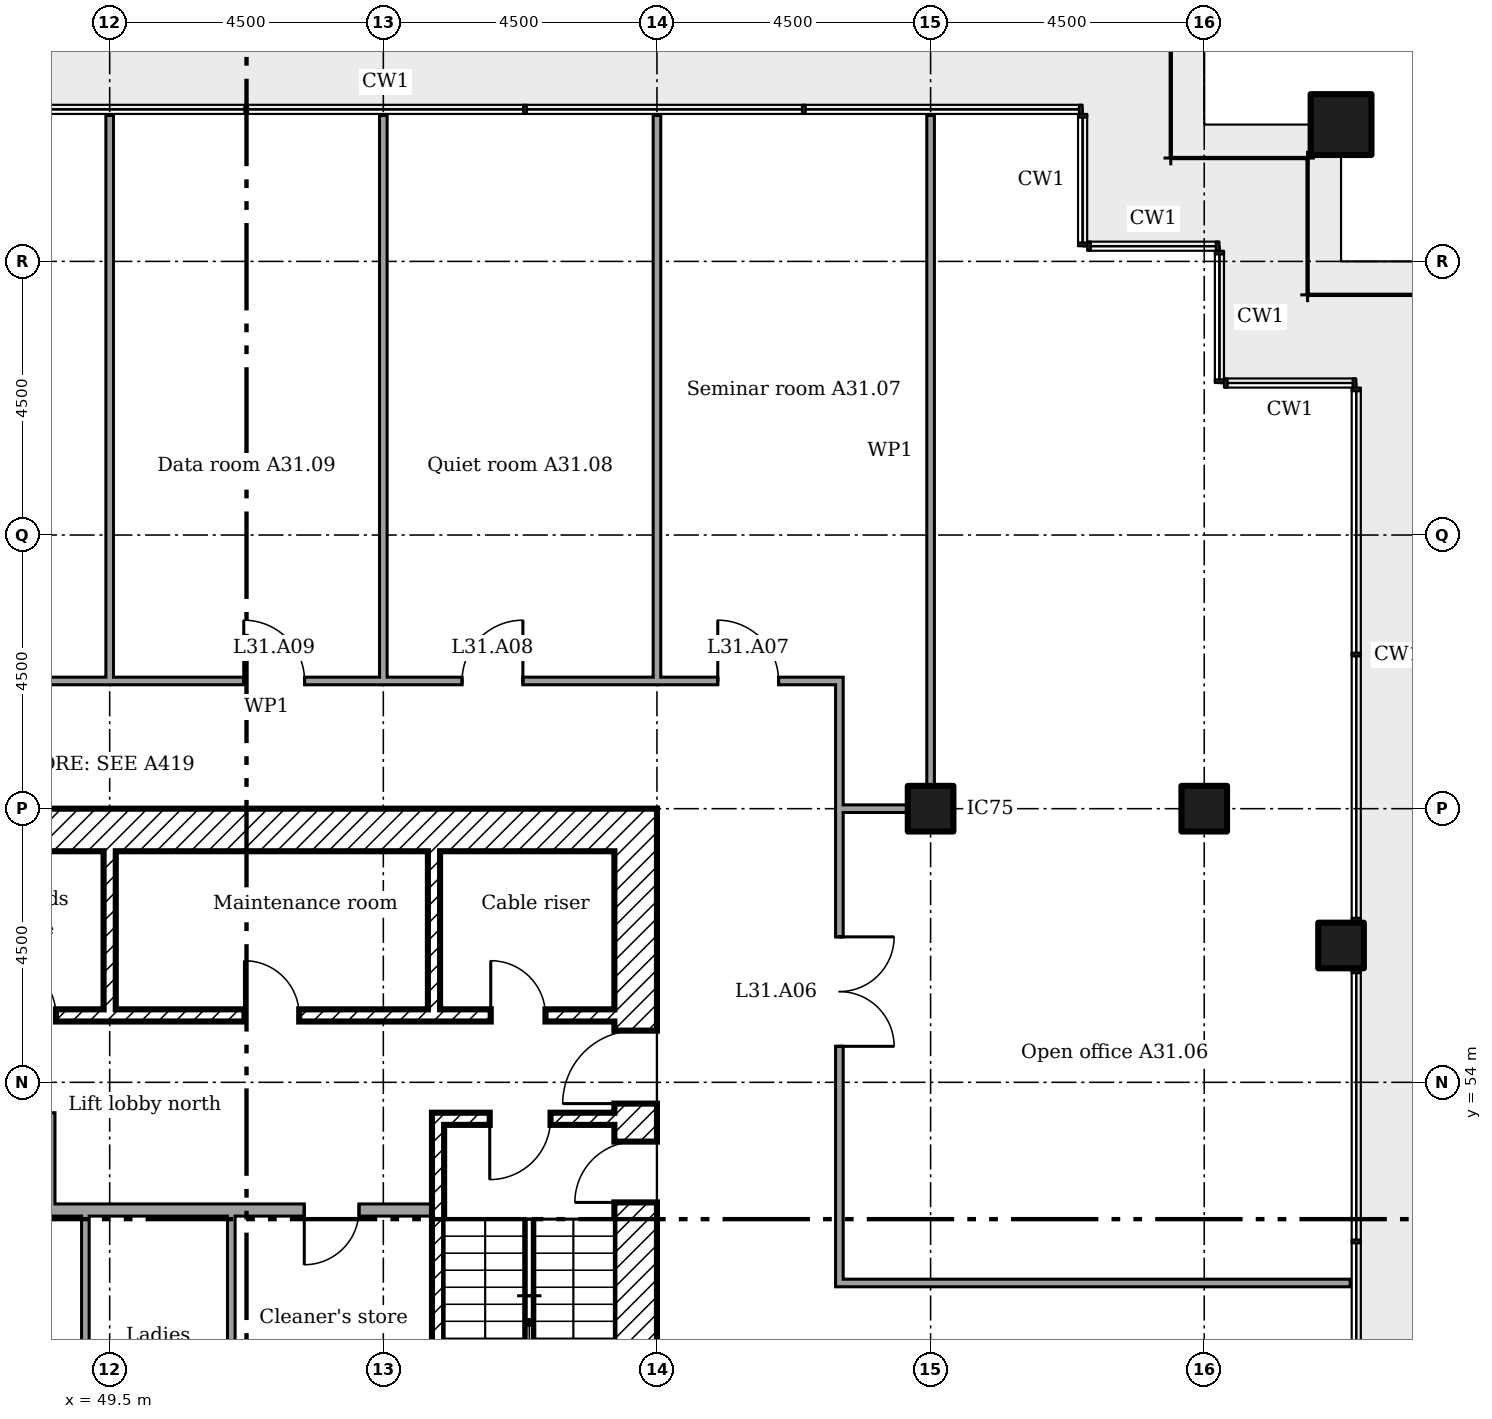
"""IFC4 building model, lengths in metres.
Left out: names, types, materials, properties, quantities, classifications, styles, units other than length and angle.
Written with IfcOpenShell. Run it as: python <this file> out.ifc"""

import sys

from ifc_helpers import new_model, si_unit, direction, frame, frame_2d, origin, origin_2d, place, context, subcontext, project, spatial, rectangle, extrude, element, fill, save


model = new_model("IFC4")
c1 = context("Model", 3, precision=1e-05, world=origin(), true_north=direction((0.0, 1.0)))
c2 = subcontext(c1, "Body", "Model", "MODEL_VIEW")
j1 = project(units=[si_unit("LENGTHUNIT", "METRE"), si_unit("PLANEANGLEUNIT", "RADIAN")], contexts=[c1])
p1 = place(None, origin())
s1 = spatial("IfcSite", under=j1, at=p1, CompositionType="ELEMENT")
p2 = place(p1, origin())
s2 = spatial("IfcBuilding", under=s1, at=p2, CompositionType="ELEMENT")
p3 = place(p2, frame((0.0, 0.0, 128.0)))
s3 = spatial("IfcBuildingStorey", under=s2, at=p3, CompositionType="ELEMENT", Elevation=128.0)
p4 = place(p3, frame((69.75, 69.75, 0.0)))
e1 = element("IfcColumn", 1, at=p4, inside=s3, PredefinedType="COLUMN", context=c2, shape_type="SweptSolid", body=[
    extrude(rectangle(XDim=1.0, YDim=1.0, at=origin_2d()), origin(), (0.0, 0.0, 1.0), 3.6),
])
for number, where in (
    (2, (63.0, 58.5, 0.0)),
    (3, (67.5, 58.5, 0.0)),
    (4, (69.75, 56.25, 0.0)),
):
    element("IfcColumn", number, at=place(p3, frame(where)), inside=s3, PredefinedType="COLUMN", context=c2, shape_type="SweptSolid", body=[
        extrude(rectangle(XDim=0.75, YDim=0.75, at=origin_2d()), origin(), (0.0, 0.0, 1.0), 3.6),
    ])
p5 = place(p3, frame((58.15, 40.5, 0.0), z_axis=(0.0, 0.0, 1.0), x_axis=(0.0, 1.0, 0.0)))
e5 = element("IfcWall", 5, at=p5, inside=s3, PredefinedType="SHEAR", context=c2, shape_type="SweptSolid", body=[
    extrude(rectangle(XDim=18.0, YDim=0.7, at=frame_2d((9.0, 0.0))), origin(), (0.0, 0.0, 1.0), 3.35),
])
p6 = place(p5, frame((13.15, 0.0, 0.0)))
e6 = element("IfcOpeningElement", 6, at=p6, cuts=e5, PredefinedType="OPENING", context=c2, shape_type="SweptSolid", body=[
    extrude(rectangle(XDim=1.2, YDim=2.1, at=frame_2d((0.6, 1.05))), frame((0.0, 0.36, 0.0), z_axis=(0.0, -1.0, 0.0), x_axis=(1.0, 0.0, 0.0)), (0.0, 0.0, 1.0), 0.72),
])
p7 = place(p5, frame((3.9, 0.0, 0.0)))
e7 = element("IfcOpeningElement", 7, at=p7, cuts=e5, PredefinedType="OPENING", context=c2, shape_type="SweptSolid", body=[
    extrude(rectangle(XDim=1.8, YDim=2.1, at=frame_2d((0.9, 1.05))), frame((0.0, 0.36, 0.0), z_axis=(0.0, -1.0, 0.0), x_axis=(1.0, 0.0, 0.0)), (0.0, 0.0, 1.0), 0.72),
])
p8 = place(p5, frame((11.525, 0.0, 0.0)))
e8 = element("IfcOpeningElement", 8, at=p8, cuts=e5, PredefinedType="OPENING", context=c2, shape_type="SweptSolid", body=[
    extrude(rectangle(XDim=1.0, YDim=2.1, at=frame_2d((0.5, 1.05))), frame((0.0, 0.36, 0.0), z_axis=(0.0, -1.0, 0.0), x_axis=(1.0, 0.0, 0.0)), (0.0, 0.0, 1.0), 0.72),
])
p9 = place(p3, frame((41.2, 58.15, 0.0)))
e9 = element("IfcWall", 9, at=p9, inside=s3, PredefinedType="SHEAR", context=c2, shape_type="SweptSolid", body=[
    extrude(rectangle(XDim=16.6, YDim=0.7, at=frame_2d((8.3, 0.0))), origin(), (0.0, 0.0, 1.0), 3.35),
])
for number, where, z_axis, x_axis in (
    (10, (49.5, 57.8, 0.0), (0.0, 0.0, 1.0), (0.0, -1.0, 0.0)),
    (11, (54.833, 57.8, 0.0), (0.0, 0.0, 1.0), (0.0, -1.0, 0.0)),
):
    element("IfcWall", number, at=place(p3, frame(where, z_axis=z_axis, x_axis=x_axis)), inside=s3, PredefinedType="SHEAR", context=c2, shape_type="SweptSolid", body=[
        extrude(rectangle(XDim=2.6, YDim=0.2, at=frame_2d((1.3, 0.0))), origin(), (0.0, 0.0, 1.0), 3.35),
    ])
p10 = place(p3, frame((48.5, 51.9, 0.0), z_axis=(0.0, 0.0, 1.0), x_axis=(0.0, 1.0, 0.0)))
e12 = element("IfcWall", 12, at=p10, inside=s3, PredefinedType="PARTITIONING", context=c2, shape_type="SweptSolid", body=[
    extrude(rectangle(XDim=1.6, YDim=0.2, at=frame_2d((0.8, 0.0))), origin(), (0.0, 0.0, 1.0), 3.35),
])
p11 = place(p3, frame((46.933, 55.1, 0.0)))
e13 = element("IfcWall", 13, at=p11, inside=s3, PredefinedType="SHEAR", context=c2, shape_type="SweptSolid", body=[
    extrude(rectangle(XDim=10.867, YDim=0.2, at=frame_2d((5.433, 0.0))), origin(), (0.0, 0.0, 1.0), 3.35),
])
p12 = place(p11, frame((8.833, 0.0, 0.0)))
e14 = element("IfcOpeningElement", 14, at=p12, cuts=e13, PredefinedType="OPENING", context=c2, shape_type="SweptSolid", body=[
    extrude(rectangle(XDim=0.9, YDim=2.1, at=frame_2d((0.45, 1.05))), frame((0.0, 0.11, 0.0), z_axis=(0.0, -1.0, 0.0), x_axis=(1.0, 0.0, 0.0)), (0.0, 0.0, 1.0), 0.22),
])
p13 = place(p11, frame((0.783, 0.0, 0.0)))
e15 = element("IfcOpeningElement", 15, at=p13, cuts=e13, PredefinedType="OPENING", context=c2, shape_type="SweptSolid", body=[
    extrude(rectangle(XDim=0.9, YDim=2.1, at=frame_2d((0.45, 1.05))), frame((0.0, 0.11, 0.0), z_axis=(0.0, -1.0, 0.0), x_axis=(1.0, 0.0, 0.0)), (0.0, 0.0, 1.0), 0.22),
])
p14 = place(p11, frame((4.783, 0.0, 0.0)))
e16 = element("IfcOpeningElement", 16, at=p14, cuts=e13, PredefinedType="OPENING", context=c2, shape_type="SweptSolid", body=[
    extrude(rectangle(XDim=0.9, YDim=2.1, at=frame_2d((0.45, 1.05))), frame((0.0, 0.11, 0.0), z_axis=(0.0, -1.0, 0.0), x_axis=(1.0, 0.0, 0.0)), (0.0, 0.0, 1.0), 0.22),
])
p15 = place(p3, frame((54.8, 53.4, 0.0)))
e17 = element("IfcWall", 17, at=p15, inside=s3, PredefinedType="SHEAR", context=c2, shape_type="SweptSolid", body=[
    extrude(rectangle(XDim=3.0, YDim=0.2, at=frame_2d((1.5, 0.0))), origin(), (0.0, 0.0, 1.0), 3.35),
])
p16 = place(p15, frame((0.95, 0.0, 0.0)))
e18 = element("IfcOpeningElement", 18, at=p16, cuts=e17, PredefinedType="OPENING", context=c2, shape_type="SweptSolid", body=[
    extrude(rectangle(XDim=1.0, YDim=2.1, at=frame_2d((0.5, 1.05))), frame((0.0, 0.11, 0.0), z_axis=(0.0, -1.0, 0.0), x_axis=(1.0, 0.0, 0.0)), (0.0, 0.0, 1.0), 0.22),
])
p17 = place(p3, frame((54.9, 46.8, 0.0), z_axis=(0.0, 0.0, 1.0), x_axis=(0.0, 1.0, 0.0)))
e19 = element("IfcWall", 19, at=p17, inside=s3, PredefinedType="SHEAR", context=c2, shape_type="SweptSolid", body=[
    extrude(rectangle(XDim=6.5, YDim=0.2, at=frame_2d((3.25, 0.0))), origin(), (0.0, 0.0, 1.0), 3.35),
])
p18 = place(p3, frame((44.2, 51.9, 0.0)))
e20 = element("IfcWall", 20, at=p18, inside=s3, PredefinedType="PARTITIONING", context=c2, shape_type="SweptSolid", body=[
    extrude(rectangle(XDim=10.6, YDim=0.2, at=frame_2d((5.3, 0.0))), origin(), (0.0, 0.0, 1.0), 3.35),
])
p19 = place(p18, frame((8.5, 0.0, 0.0)))
e21 = element("IfcOpeningElement", 21, at=p19, cuts=e20, PredefinedType="OPENING", context=c2, shape_type="SweptSolid", body=[
    extrude(rectangle(XDim=0.9, YDim=2.1, at=frame_2d((0.45, 1.05))), frame((0.0, 0.11, 0.0), z_axis=(0.0, -1.0, 0.0), x_axis=(1.0, 0.0, 0.0)), (0.0, 0.0, 1.0), 0.22),
])
p20 = place(p3, frame((49.1, 46.8, 0.0), z_axis=(0.0, 0.0, 1.0), x_axis=(0.0, 1.0, 0.0)))
e22 = element("IfcWall", 22, at=p20, inside=s3, PredefinedType="PARTITIONING", context=c2, shape_type="SweptSolid", body=[
    extrude(rectangle(XDim=5.0, YDim=0.125, at=frame_2d((2.5, 0.0))), origin(), (0.0, 0.0, 1.0), 3.35),
])
p21 = place(p3, frame((51.5, 49.5, 0.0), z_axis=(0.0, 0.0, 1.0), x_axis=(0.0, 1.0, 0.0)))
e23 = element("IfcWall", 23, at=p21, inside=s3, PredefinedType="PARTITIONING", context=c2, shape_type="SweptSolid", body=[
    extrude(rectangle(XDim=2.3, YDim=0.125, at=frame_2d((1.15, 0.0))), origin(), (0.0, 0.0, 1.0), 3.35),
])
p22 = place(p3, frame((61.438, 50.7, 0.0)))
e24 = element("IfcWall", 24, at=p22, inside=s3, PredefinedType="PARTITIONING", context=c2, shape_type="SweptSolid", body=[
    extrude(rectangle(XDim=8.462, YDim=0.125, at=frame_2d((4.231, 0.0))), origin(), (0.0, 0.0, 1.0), 3.45),
])
p23 = place(p3, frame((61.5, 58.5, 0.0)))
e25 = element("IfcWall", 25, at=p23, inside=s3, PredefinedType="PARTITIONING", context=c2, shape_type="SweptSolid", body=[
    extrude(rectangle(XDim=1.125, YDim=0.125, at=frame_2d((0.562, 0.0))), origin(), (0.0, 0.0, 1.0), 2.676),
])
p24 = place(p3, frame((42.6, 60.6, 0.0)))
e26 = element("IfcWall", 26, at=p24, inside=s3, PredefinedType="PARTITIONING", context=c2, shape_type="SweptSolid", body=[
    extrude(rectangle(XDim=18.962, YDim=0.125, at=frame_2d((9.481, 0.0))), origin(), (0.0, 0.0, 1.0), 3.45),
])
p25 = place(p24, frame((16.9, 0.0, 0.0)))
e27 = element("IfcOpeningElement", 27, at=p25, cuts=e26, PredefinedType="OPENING", context=c2, shape_type="SweptSolid", body=[
    extrude(rectangle(XDim=1.0, YDim=2.1, at=frame_2d((0.5, 1.05))), frame((0.0, 0.073, 0.0), z_axis=(0.0, -1.0, 0.0), x_axis=(1.0, 0.0, 0.0)), (0.0, 0.0, 1.0), 0.145),
])
p26 = place(p24, frame((12.695, 0.0, 0.0)))
e28 = element("IfcOpeningElement", 28, at=p26, cuts=e26, PredefinedType="OPENING", context=c2, shape_type="SweptSolid", body=[
    extrude(rectangle(XDim=1.0, YDim=2.1, at=frame_2d((0.5, 1.05))), frame((0.0, 0.073, 0.0), z_axis=(0.0, -1.0, 0.0), x_axis=(1.0, 0.0, 0.0)), (0.0, 0.0, 1.0), 0.145),
])
p27 = place(p24, frame((9.105, 0.0, 0.0)))
e29 = element("IfcOpeningElement", 29, at=p27, cuts=e26, PredefinedType="OPENING", context=c2, shape_type="SweptSolid", body=[
    extrude(rectangle(XDim=1.0, YDim=2.1, at=frame_2d((0.5, 1.05))), frame((0.0, 0.073, 0.0), z_axis=(0.0, -1.0, 0.0), x_axis=(1.0, 0.0, 0.0)), (0.0, 0.0, 1.0), 0.145),
])
p28 = place(p24, frame((2.95, 0.0, 0.0)))
e30 = element("IfcOpeningElement", 30, at=p28, cuts=e26, PredefinedType="OPENING", context=c2, shape_type="SweptSolid", body=[
    extrude(rectangle(XDim=1.0, YDim=2.1, at=frame_2d((0.5, 1.05))), frame((0.0, 0.073, 0.0), z_axis=(0.0, -1.0, 0.0), x_axis=(1.0, 0.0, 0.0)), (0.0, 0.0, 1.0), 0.145),
])
for number, where, z_axis, x_axis in (
    (31, (49.5, 60.6, 0.0), (0.0, 0.0, 1.0), (0.0, 1.0, 0.0)),
    (32, (54.0, 60.6, 0.0), (0.0, 0.0, 1.0), (0.0, 1.0, 0.0)),
    (33, (58.5, 60.6, 0.0), (0.0, 0.0, 1.0), (0.0, 1.0, 0.0)),
):
    element("IfcWall", number, at=place(p3, frame(where, z_axis=z_axis, x_axis=x_axis)), inside=s3, PredefinedType="PARTITIONING", context=c2, shape_type="SweptSolid", body=[
        extrude(rectangle(XDim=9.3, YDim=0.125, at=frame_2d((4.65, 0.0))), origin(), (0.0, 0.0, 1.0), 2.766),
    ])
p29 = place(p3, frame((61.5, 50.762, 0.0), z_axis=(0.0, 0.0, 1.0), x_axis=(0.0, 1.0, 0.0)))
e34 = element("IfcWall", 34, at=p29, inside=s3, PredefinedType="PARTITIONING", context=c2, shape_type="SweptSolid", body=[
    extrude(rectangle(XDim=9.775, YDim=0.125, at=frame_2d((4.888, 0.0))), origin(), (0.0, 0.0, 1.0), 3.45),
])
p30 = place(p29, frame((3.83, 0.0, 0.0)))
e35 = element("IfcOpeningElement", 35, at=p30, cuts=e34, PredefinedType="OPENING", context=c2, shape_type="SweptSolid", body=[
    extrude(rectangle(XDim=1.8, YDim=2.1, at=frame_2d((0.9, 1.05))), frame((0.0, 0.073, 0.0), z_axis=(0.0, -1.0, 0.0), x_axis=(1.0, 0.0, 0.0)), (0.0, 0.0, 1.0), 0.145),
])
p31 = place(p3, frame((63.0, 58.875, 0.0), z_axis=(0.0, 0.0, 1.0), x_axis=(0.0, 1.0, 0.0)))
e36 = element("IfcWall", 36, at=p31, inside=s3, PredefinedType="PARTITIONING", context=c2, shape_type="SweptSolid", body=[
    extrude(rectangle(XDim=11.025, YDim=0.125, at=frame_2d((5.512, 0.0))), origin(), (0.0, 0.0, 1.0), 2.766),
])
p32 = place(p6, origin())
e37 = element("IfcDoor", 37, at=p32, inside=s3, OperationType="SINGLE_SWING_RIGHT", PredefinedType="DOOR", context=c2, shape_type="SweptSolid", body=[
    extrude(rectangle(XDim=1.2, YDim=2.1, at=frame_2d((0.6, 1.05))), frame((0.0, 0.025, 0.0), z_axis=(0.0, -1.0, 0.0), x_axis=(1.0, 0.0, 0.0)), (0.0, 0.0, 1.0), 0.05),
])
fill(e6, e37)
p33 = place(p16, frame((1.0, 0.0, 0.0), x_axis=(-1.0, 0.0, 0.0)))
e38 = element("IfcDoor", 38, at=p33, inside=s3, OperationType="SINGLE_SWING_LEFT", PredefinedType="DOOR", context=c2, shape_type="SweptSolid", body=[
    extrude(rectangle(XDim=1.0, YDim=2.1, at=frame_2d((0.5, 1.05))), frame((0.0, 0.025, 0.0), z_axis=(0.0, -1.0, 0.0), x_axis=(1.0, 0.0, 0.0)), (0.0, 0.0, 1.0), 0.05),
])
fill(e18, e38)
p34 = place(p8, origin())
e39 = element("IfcDoor", 39, at=p34, inside=s3, OperationType="SINGLE_SWING_RIGHT", PredefinedType="DOOR", context=c2, shape_type="SweptSolid", body=[
    extrude(rectangle(XDim=1.0, YDim=2.1, at=frame_2d((0.5, 1.05))), frame((0.0, 0.025, 0.0), z_axis=(0.0, -1.0, 0.0), x_axis=(1.0, 0.0, 0.0)), (0.0, 0.0, 1.0), 0.05),
])
fill(e8, e39)
p35 = place(p12, origin())
e40 = element("IfcDoor", 40, at=p35, inside=s3, OperationType="SINGLE_SWING_RIGHT", PredefinedType="DOOR", context=c2, shape_type="SweptSolid", body=[
    extrude(rectangle(XDim=0.9, YDim=2.1, at=frame_2d((0.45, 1.05))), frame((0.0, 0.025, 0.0), z_axis=(0.0, -1.0, 0.0), x_axis=(1.0, 0.0, 0.0)), (0.0, 0.0, 1.0), 0.05),
])
fill(e14, e40)
p36 = place(p13, origin())
e41 = element("IfcDoor", 41, at=p36, inside=s3, OperationType="SINGLE_SWING_RIGHT", PredefinedType="DOOR", context=c2, shape_type="SweptSolid", body=[
    extrude(rectangle(XDim=0.9, YDim=2.1, at=frame_2d((0.45, 1.05))), frame((0.0, 0.025, 0.0), z_axis=(0.0, -1.0, 0.0), x_axis=(1.0, 0.0, 0.0)), (0.0, 0.0, 1.0), 0.05),
])
fill(e15, e41)
p37 = place(p14, origin())
e42 = element("IfcDoor", 42, at=p37, inside=s3, OperationType="SINGLE_SWING_RIGHT", PredefinedType="DOOR", context=c2, shape_type="SweptSolid", body=[
    extrude(rectangle(XDim=0.9, YDim=2.1, at=frame_2d((0.45, 1.05))), frame((0.0, 0.025, 0.0), z_axis=(0.0, -1.0, 0.0), x_axis=(1.0, 0.0, 0.0)), (0.0, 0.0, 1.0), 0.05),
])
fill(e16, e42)
p38 = place(p19, frame((0.9, 0.0, 0.0), x_axis=(-1.0, 0.0, 0.0)))
e43 = element("IfcDoor", 43, at=p38, inside=s3, OperationType="SINGLE_SWING_LEFT", PredefinedType="DOOR", context=c2, shape_type="SweptSolid", body=[
    extrude(rectangle(XDim=0.9, YDim=2.1, at=frame_2d((0.45, 1.05))), frame((0.0, 0.025, 0.0), z_axis=(0.0, -1.0, 0.0), x_axis=(1.0, 0.0, 0.0)), (0.0, 0.0, 1.0), 0.05),
])
fill(e21, e43)
p39 = place(p30, frame((1.8, 0.0, 0.0), x_axis=(-1.0, 0.0, 0.0)))
e44 = element("IfcDoor", 44, at=p39, inside=s3, OperationType="DOUBLE_DOOR_SINGLE_SWING", PredefinedType="DOOR", context=c2, shape_type="SweptSolid", body=[
    extrude(rectangle(XDim=1.8, YDim=2.1, at=frame_2d((0.9, 1.05))), frame((0.0, 0.025, 0.0), z_axis=(0.0, -1.0, 0.0), x_axis=(1.0, 0.0, 0.0)), (0.0, 0.0, 1.0), 0.05),
])
fill(e35, e44)
p40 = place(p25, origin())
e45 = element("IfcDoor", 45, at=p40, inside=s3, OperationType="SINGLE_SWING_RIGHT", PredefinedType="DOOR", context=c2, shape_type="SweptSolid", body=[
    extrude(rectangle(XDim=1.0, YDim=2.1, at=frame_2d((0.5, 1.05))), frame((0.0, 0.025, 0.0), z_axis=(0.0, -1.0, 0.0), x_axis=(1.0, 0.0, 0.0)), (0.0, 0.0, 1.0), 0.05),
])
fill(e27, e45)
p41 = place(p26, origin())
e46 = element("IfcDoor", 46, at=p41, inside=s3, OperationType="SINGLE_SWING_LEFT", PredefinedType="DOOR", context=c2, shape_type="SweptSolid", body=[
    extrude(rectangle(XDim=1.0, YDim=2.1, at=frame_2d((0.5, 1.05))), frame((0.0, 0.025, 0.0), z_axis=(0.0, -1.0, 0.0), x_axis=(1.0, 0.0, 0.0)), (0.0, 0.0, 1.0), 0.05),
])
fill(e28, e46)
p42 = place(p27, origin())
e47 = element("IfcDoor", 47, at=p42, inside=s3, OperationType="SINGLE_SWING_RIGHT", PredefinedType="DOOR", context=c2, shape_type="SweptSolid", body=[
    extrude(rectangle(XDim=1.0, YDim=2.1, at=frame_2d((0.5, 1.05))), frame((0.0, 0.025, 0.0), z_axis=(0.0, -1.0, 0.0), x_axis=(1.0, 0.0, 0.0)), (0.0, 0.0, 1.0), 0.05),
])
fill(e29, e47)
save(model, sys.argv[1])
